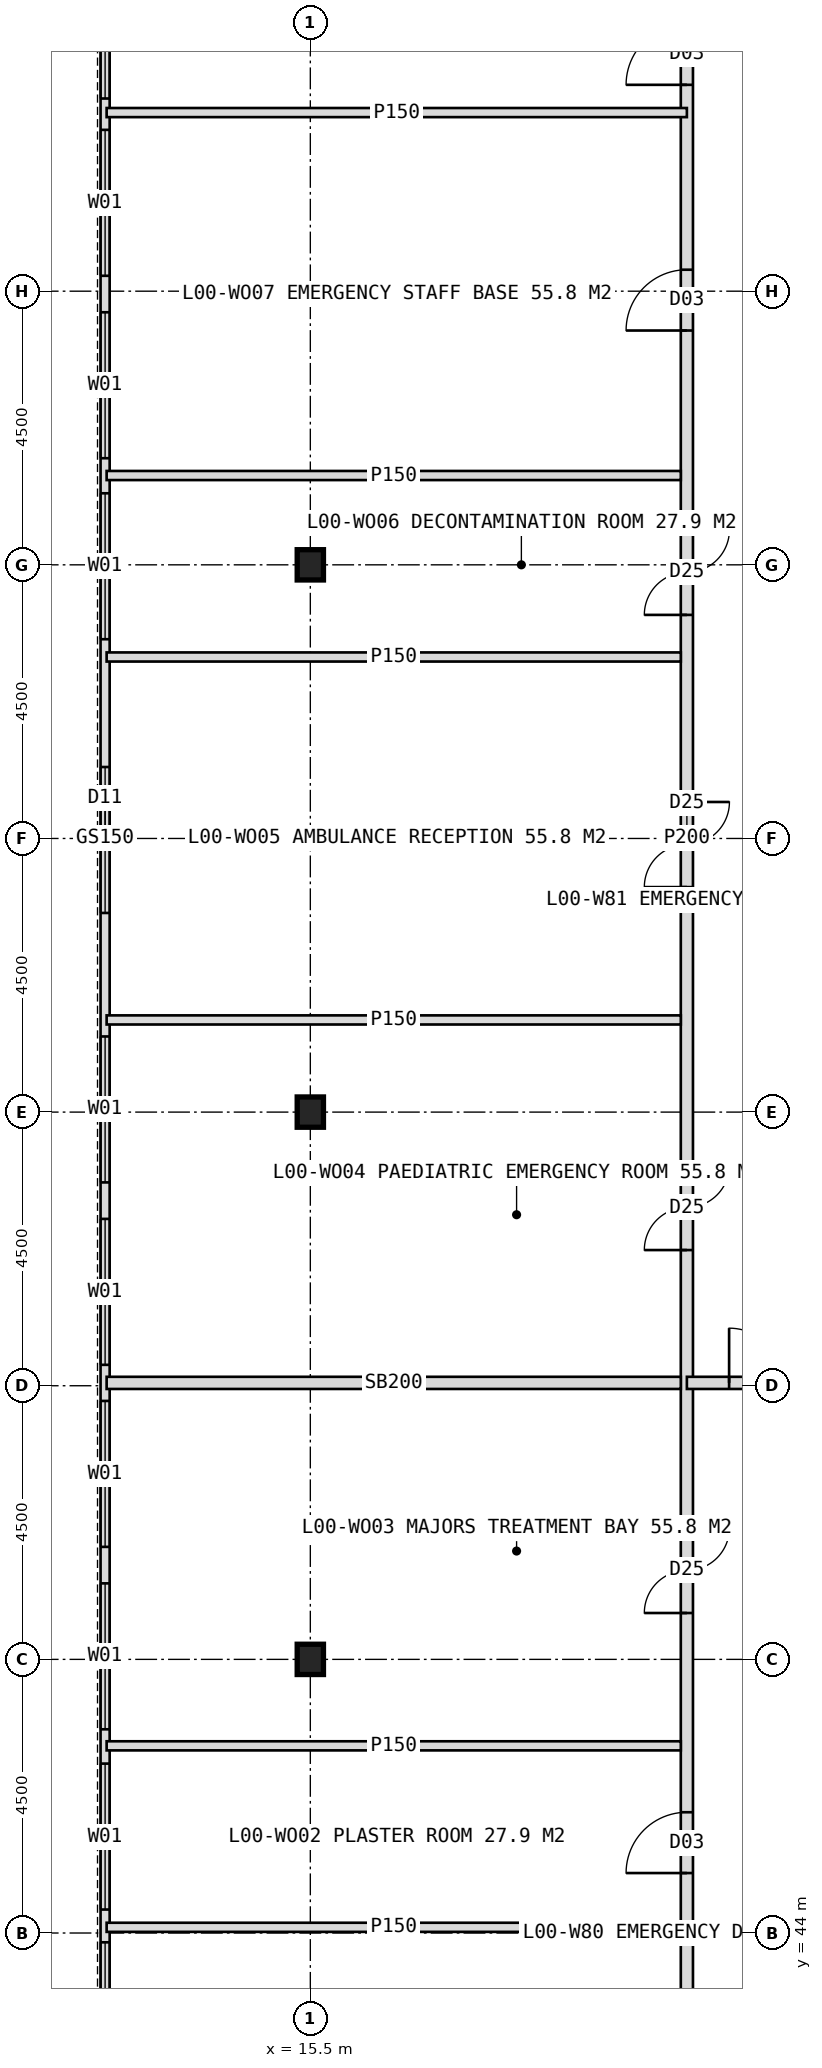
"""IFC4 building model, lengths in metres.
Left out: names, types, materials, properties, quantities, classifications, styles, units other than length and angle.
Written with IfcOpenShell. Run it as: python <this file> out.ifc"""

import sys

from ifc_helpers import new_model, si_unit, direction, frame, frame_2d, origin, origin_2d, place, context, subcontext, project, spatial, rectangle, i_section, extrude, element, fill, save


model = new_model("IFC4")
c1 = context("Model", 3, precision=1e-05, world=origin(), true_north=direction((0.0, 1.0)))
c2 = subcontext(c1, "Body", "Model", "MODEL_VIEW")
j1 = project(units=[si_unit("LENGTHUNIT", "METRE"), si_unit("PLANEANGLEUNIT", "RADIAN")], contexts=[c1])
p1 = place(None, origin())
s1 = spatial("IfcSite", under=j1, at=p1, CompositionType="ELEMENT")
p2 = place(p1, origin())
s2 = spatial("IfcBuilding", under=s1, at=p2, CompositionType="ELEMENT")
p3 = place(p2, origin())
s3 = spatial("IfcBuildingStorey", under=s2, at=p3, CompositionType="ELEMENT", Elevation=0.0)
for number, where, z_axis, x_axis in (
    (1, (15.5, 48.5, 0.0), (0.0, 0.0, 1.0), (1.0, 0.0, 0.0)),
    (2, (15.5, 57.5, 0.0), (0.0, 0.0, 1.0), (1.0, 0.0, 0.0)),
    (3, (15.5, 66.5, 0.0), (0.0, 0.0, 1.0), (1.0, 0.0, 0.0)),
):
    element("IfcColumn", number, at=place(p3, frame(where, z_axis=z_axis, x_axis=x_axis)), inside=s3, PredefinedType="COLUMN", context=c2, shape_type="SweptSolid", body=[
        extrude(i_section(OverallWidth=0.432, OverallDepth=0.498, WebThickness=0.056, FlangeThickness=0.089, FilletRadius=0.015, at=origin_2d()), origin(), (0.0, 0.0, 1.0), 6.0),
    ])
p4 = place(p3, frame((12.125, 85.875, 0.0), z_axis=(0.0, 0.0, 1.0), x_axis=(0.0, -1.0, 0.0)))
e4 = element("IfcWall", 4, at=p4, inside=s3, PredefinedType="STANDARD", context=c2, shape_type="SweptSolid", body=[
    extrude(rectangle(XDim=47.75, YDim=0.15, at=frame_2d((23.875, 0.0))), origin(), (0.0, 0.0, 1.0), 6.0),
])
p5 = place(p4, frame((22.7, 0.0, 0.0)))
e5 = element("IfcOpeningElement", 5, at=p5, cuts=e4, PredefinedType="OPENING", context=c2, shape_type="SweptSolid", body=[
    extrude(rectangle(XDim=2.4, YDim=2.7, at=frame_2d((1.2, 1.35))), frame((0.0, 0.085, 0.0), z_axis=(0.0, -1.0, 0.0), x_axis=(1.0, 0.0, 0.0)), (0.0, 0.0, 1.0), 0.17),
])
p6 = place(p4, frame((0.306, 0.0, 0.6)))
e6 = element("IfcOpeningElement", 6, at=p6, cuts=e4, PredefinedType="OPENING", context=c2, shape_type="SweptSolid", body=[
    extrude(rectangle(XDim=2.4, YDim=3.0, at=frame_2d((1.2, 1.5))), frame((0.0, 0.085, 0.0), z_axis=(0.0, -1.0, 0.0), x_axis=(1.0, 0.0, 0.0)), (0.0, 0.0, 1.0), 0.17),
])
p7 = place(p4, frame((3.306, 0.0, 0.6)))
e7 = element("IfcOpeningElement", 7, at=p7, cuts=e4, PredefinedType="OPENING", context=c2, shape_type="SweptSolid", body=[
    extrude(rectangle(XDim=2.4, YDim=3.0, at=frame_2d((1.2, 1.5))), frame((0.0, 0.085, 0.0), z_axis=(0.0, -1.0, 0.0), x_axis=(1.0, 0.0, 0.0)), (0.0, 0.0, 1.0), 0.17),
])
p8 = place(p4, frame((6.306, 0.0, 0.6)))
e8 = element("IfcOpeningElement", 8, at=p8, cuts=e4, PredefinedType="OPENING", context=c2, shape_type="SweptSolid", body=[
    extrude(rectangle(XDim=2.4, YDim=3.0, at=frame_2d((1.2, 1.5))), frame((0.0, 0.085, 0.0), z_axis=(0.0, -1.0, 0.0), x_axis=(1.0, 0.0, 0.0)), (0.0, 0.0, 1.0), 0.17),
])
p9 = place(p4, frame((9.306, 0.0, 0.6)))
e9 = element("IfcOpeningElement", 9, at=p9, cuts=e4, PredefinedType="OPENING", context=c2, shape_type="SweptSolid", body=[
    extrude(rectangle(XDim=2.4, YDim=3.0, at=frame_2d((1.2, 1.5))), frame((0.0, 0.085, 0.0), z_axis=(0.0, -1.0, 0.0), x_axis=(1.0, 0.0, 0.0)), (0.0, 0.0, 1.0), 0.17),
])
p10 = place(p4, frame((12.222, 0.0, 0.6)))
e10 = element("IfcOpeningElement", 10, at=p10, cuts=e4, PredefinedType="OPENING", context=c2, shape_type="SweptSolid", body=[
    extrude(rectangle(XDim=2.4, YDim=3.0, at=frame_2d((1.2, 1.5))), frame((0.0, 0.085, 0.0), z_axis=(0.0, -1.0, 0.0), x_axis=(1.0, 0.0, 0.0)), (0.0, 0.0, 1.0), 0.17),
])
p11 = place(p4, frame((15.222, 0.0, 0.6)))
e11 = element("IfcOpeningElement", 11, at=p11, cuts=e4, PredefinedType="OPENING", context=c2, shape_type="SweptSolid", body=[
    extrude(rectangle(XDim=2.4, YDim=3.0, at=frame_2d((1.2, 1.5))), frame((0.0, 0.085, 0.0), z_axis=(0.0, -1.0, 0.0), x_axis=(1.0, 0.0, 0.0)), (0.0, 0.0, 1.0), 0.17),
])
p12 = place(p4, frame((18.198, 0.0, 0.6)))
e12 = element("IfcOpeningElement", 12, at=p12, cuts=e4, PredefinedType="OPENING", context=c2, shape_type="SweptSolid", body=[
    extrude(rectangle(XDim=2.4, YDim=3.0, at=frame_2d((1.2, 1.5))), frame((0.0, 0.085, 0.0), z_axis=(0.0, -1.0, 0.0), x_axis=(1.0, 0.0, 0.0)), (0.0, 0.0, 1.0), 0.17),
])
p13 = place(p4, frame((27.131, 0.0, 0.6)))
e13 = element("IfcOpeningElement", 13, at=p13, cuts=e4, PredefinedType="OPENING", context=c2, shape_type="SweptSolid", body=[
    extrude(rectangle(XDim=2.4, YDim=3.0, at=frame_2d((1.2, 1.5))), frame((0.0, 0.085, 0.0), z_axis=(0.0, -1.0, 0.0), x_axis=(1.0, 0.0, 0.0)), (0.0, 0.0, 1.0), 0.17),
])
p14 = place(p4, frame((30.131, 0.0, 0.6)))
e14 = element("IfcOpeningElement", 14, at=p14, cuts=e4, PredefinedType="OPENING", context=c2, shape_type="SweptSolid", body=[
    extrude(rectangle(XDim=2.4, YDim=3.0, at=frame_2d((1.2, 1.5))), frame((0.0, 0.085, 0.0), z_axis=(0.0, -1.0, 0.0), x_axis=(1.0, 0.0, 0.0)), (0.0, 0.0, 1.0), 0.17),
])
p15 = place(p4, frame((33.125, 0.0, 0.6)))
e15 = element("IfcOpeningElement", 15, at=p15, cuts=e4, PredefinedType="OPENING", context=c2, shape_type="SweptSolid", body=[
    extrude(rectangle(XDim=2.4, YDim=3.0, at=frame_2d((1.2, 1.5))), frame((0.0, 0.085, 0.0), z_axis=(0.0, -1.0, 0.0), x_axis=(1.0, 0.0, 0.0)), (0.0, 0.0, 1.0), 0.17),
])
p16 = place(p4, frame((36.125, 0.0, 0.6)))
e16 = element("IfcOpeningElement", 16, at=p16, cuts=e4, PredefinedType="OPENING", context=c2, shape_type="SweptSolid", body=[
    extrude(rectangle(XDim=2.4, YDim=3.0, at=frame_2d((1.2, 1.5))), frame((0.0, 0.085, 0.0), z_axis=(0.0, -1.0, 0.0), x_axis=(1.0, 0.0, 0.0)), (0.0, 0.0, 1.0), 0.17),
])
p17 = place(p4, frame((39.089, 0.0, 0.6)))
e17 = element("IfcOpeningElement", 17, at=p17, cuts=e4, PredefinedType="OPENING", context=c2, shape_type="SweptSolid", body=[
    extrude(rectangle(XDim=2.4, YDim=3.0, at=frame_2d((1.2, 1.5))), frame((0.0, 0.085, 0.0), z_axis=(0.0, -1.0, 0.0), x_axis=(1.0, 0.0, 0.0)), (0.0, 0.0, 1.0), 0.17),
])
p18 = place(p4, frame((42.028, 0.0, 0.6)))
e18 = element("IfcOpeningElement", 18, at=p18, cuts=e4, PredefinedType="OPENING", context=c2, shape_type="SweptSolid", body=[
    extrude(rectangle(XDim=2.4, YDim=3.0, at=frame_2d((1.2, 1.5))), frame((0.0, 0.085, 0.0), z_axis=(0.0, -1.0, 0.0), x_axis=(1.0, 0.0, 0.0)), (0.0, 0.0, 1.0), 0.17),
])
p19 = place(p4, frame((45.028, 0.0, 0.6)))
e19 = element("IfcOpeningElement", 19, at=p19, cuts=e4, PredefinedType="OPENING", context=c2, shape_type="SweptSolid", body=[
    extrude(rectangle(XDim=2.4, YDim=3.0, at=frame_2d((1.2, 1.5))), frame((0.0, 0.085, 0.0), z_axis=(0.0, -1.0, 0.0), x_axis=(1.0, 0.0, 0.0)), (0.0, 0.0, 1.0), 0.17),
])
p20 = place(p3, frame((21.693, 38.15, 0.0), z_axis=(0.0, 0.0, 1.0), x_axis=(0.0, 1.0, 0.0)))
e20 = element("IfcWall", 20, at=p20, inside=s3, PredefinedType="PARTITIONING", context=c2, shape_type="SweptSolid", body=[
    extrude(rectangle(XDim=47.7, YDim=0.2, at=frame_2d((23.85, 0.0))), origin(), (0.0, 0.0, 1.0), 5.7),
])
p21 = place(p20, frame((45.7, 0.0, 0.0)))
e21 = element("IfcOpeningElement", 21, at=p21, cuts=e20, PredefinedType="OPENING", context=c2, shape_type="SweptSolid", body=[
    extrude(rectangle(XDim=1.2, YDim=2.1, at=frame_2d((0.6, 1.05))), frame((0.0, 0.11, 0.0), z_axis=(0.0, -1.0, 0.0), x_axis=(1.0, 0.0, 0.0)), (0.0, 0.0, 1.0), 0.22),
])
p22 = place(p20, frame((36.244, 0.0, 0.0)))
e22 = element("IfcOpeningElement", 22, at=p22, cuts=e20, PredefinedType="OPENING", context=c2, shape_type="SweptSolid", body=[
    extrude(rectangle(XDim=1.0, YDim=2.1, at=frame_2d((0.5, 1.05))), frame((0.0, 0.11, 0.0), z_axis=(0.0, -1.0, 0.0), x_axis=(1.0, 0.0, 0.0)), (0.0, 0.0, 1.0), 0.22),
])
p23 = place(p20, frame((2.222, 0.0, 0.0)))
e23 = element("IfcOpeningElement", 23, at=p23, cuts=e20, PredefinedType="OPENING", context=c2, shape_type="SweptSolid", body=[
    extrude(rectangle(XDim=1.4, YDim=2.2, at=frame_2d((0.7, 1.1))), frame((0.0, 0.11, 0.0), z_axis=(0.0, -1.0, 0.0), x_axis=(1.0, 0.0, 0.0)), (0.0, 0.0, 1.0), 0.22),
])
p24 = place(p20, frame((6.836, 0.0, 0.0)))
e24 = element("IfcOpeningElement", 24, at=p24, cuts=e20, PredefinedType="OPENING", context=c2, shape_type="SweptSolid", body=[
    extrude(rectangle(XDim=1.0, YDim=2.1, at=frame_2d((0.5, 1.05))), frame((0.0, 0.11, 0.0), z_axis=(0.0, -1.0, 0.0), x_axis=(1.0, 0.0, 0.0)), (0.0, 0.0, 1.0), 0.22),
])
p25 = place(p20, frame((11.113, 0.0, 0.0)))
e25 = element("IfcOpeningElement", 25, at=p25, cuts=e20, PredefinedType="OPENING", context=c2, shape_type="SweptSolid", body=[
    extrude(rectangle(XDim=1.4, YDim=2.2, at=frame_2d((0.7, 1.1))), frame((0.0, 0.11, 0.0), z_axis=(0.0, -1.0, 0.0), x_axis=(1.0, 0.0, 0.0)), (0.0, 0.0, 1.0), 0.22),
])
p26 = place(p20, frame((17.081, 0.0, 0.0)))
e26 = element("IfcOpeningElement", 26, at=p26, cuts=e20, PredefinedType="OPENING", context=c2, shape_type="SweptSolid", body=[
    extrude(rectangle(XDim=1.4, YDim=2.2, at=frame_2d((0.7, 1.1))), frame((0.0, 0.11, 0.0), z_axis=(0.0, -1.0, 0.0), x_axis=(1.0, 0.0, 0.0)), (0.0, 0.0, 1.0), 0.22),
])
p27 = place(p20, frame((23.05, 0.0, 0.0)))
e27 = element("IfcOpeningElement", 27, at=p27, cuts=e20, PredefinedType="OPENING", context=c2, shape_type="SweptSolid", body=[
    extrude(rectangle(XDim=1.4, YDim=2.2, at=frame_2d((0.7, 1.1))), frame((0.0, 0.11, 0.0), z_axis=(0.0, -1.0, 0.0), x_axis=(1.0, 0.0, 0.0)), (0.0, 0.0, 1.0), 0.22),
])
p28 = place(p20, frame((27.527, 0.0, 0.0)))
e28 = element("IfcOpeningElement", 28, at=p28, cuts=e20, PredefinedType="OPENING", context=c2, shape_type="SweptSolid", body=[
    extrude(rectangle(XDim=1.4, YDim=2.2, at=frame_2d((0.7, 1.1))), frame((0.0, 0.11, 0.0), z_axis=(0.0, -1.0, 0.0), x_axis=(1.0, 0.0, 0.0)), (0.0, 0.0, 1.0), 0.22),
])
p29 = place(p20, frame((32.203, 0.0, 0.0)))
e29 = element("IfcOpeningElement", 29, at=p29, cuts=e20, PredefinedType="OPENING", context=c2, shape_type="SweptSolid", body=[
    extrude(rectangle(XDim=1.0, YDim=2.1, at=frame_2d((0.5, 1.05))), frame((0.0, 0.11, 0.0), z_axis=(0.0, -1.0, 0.0), x_axis=(1.0, 0.0, 0.0)), (0.0, 0.0, 1.0), 0.22),
])
p30 = place(p3, frame((21.693, 53.047, 0.0), z_axis=(0.0, 0.0, 1.0), x_axis=(1.0, 0.0, 0.0)))
e30 = element("IfcWall", 30, at=p30, inside=s3, PredefinedType="SOLIDWALL", context=c2, shape_type="SweptSolid", body=[
    extrude(rectangle(XDim=3.189, YDim=0.2, at=frame_2d((1.594, 0.0))), origin(), (0.0, 0.0, 1.0), 5.7),
])
p31 = place(p30, frame((0.695, 0.0, 0.0)))
e31 = element("IfcOpeningElement", 31, at=p31, cuts=e30, PredefinedType="OPENING", context=c2, shape_type="SweptSolid", body=[
    extrude(rectangle(XDim=1.8, YDim=2.2, at=frame_2d((0.9, 1.1))), frame((0.0, 0.11, 0.0), z_axis=(0.0, -1.0, 0.0), x_axis=(1.0, 0.0, 0.0)), (0.0, 0.0, 1.0), 0.22),
])
p32 = place(p3, frame((12.15, 73.938, 0.0), z_axis=(0.0, 0.0, 1.0), x_axis=(1.0, 0.0, 0.0)))
e32 = element("IfcWall", 32, at=p32, inside=s3, PredefinedType="PARTITIONING", context=c2, shape_type="SweptSolid", body=[
    extrude(rectangle(XDim=9.543, YDim=0.15, at=frame_2d((4.771, 0.0))), origin(), (0.0, 0.0, 1.0), 5.7),
])
for number, where, z_axis, x_axis in (
    (33, (12.15, 44.094, 0.0), (0.0, 0.0, 1.0), (1.0, 0.0, 0.0)),
    (34, (12.15, 47.078, 0.0), (0.0, 0.0, 1.0), (1.0, 0.0, 0.0)),
):
    element("IfcWall", number, at=place(p3, frame(where, z_axis=z_axis, x_axis=x_axis)), inside=s3, PredefinedType="PARTITIONING", context=c2, shape_type="SweptSolid", body=[
        extrude(rectangle(XDim=9.443, YDim=0.15, at=frame_2d((4.722, 0.0))), origin(), (0.0, 0.0, 1.0), 5.7),
    ])
p33 = place(p3, frame((12.15, 53.047, 0.0), z_axis=(0.0, 0.0, 1.0), x_axis=(1.0, 0.0, 0.0)))
e35 = element("IfcWall", 35, at=p33, inside=s3, PredefinedType="SOLIDWALL", context=c2, shape_type="SweptSolid", body=[
    extrude(rectangle(XDim=9.443, YDim=0.2, at=frame_2d((4.722, 0.0))), origin(), (0.0, 0.0, 1.0), 5.7),
])
for number, where, z_axis, x_axis in (
    (36, (12.15, 59.016, 0.0), (0.0, 0.0, 1.0), (1.0, 0.0, 0.0)),
    (37, (12.15, 64.984, 0.0), (0.0, 0.0, 1.0), (1.0, 0.0, 0.0)),
    (38, (12.15, 67.969, 0.0), (0.0, 0.0, 1.0), (1.0, 0.0, 0.0)),
):
    element("IfcWall", number, at=place(p3, frame(where, z_axis=z_axis, x_axis=x_axis)), inside=s3, PredefinedType="PARTITIONING", context=c2, shape_type="SweptSolid", body=[
        extrude(rectangle(XDim=9.443, YDim=0.15, at=frame_2d((4.722, 0.0))), origin(), (0.0, 0.0, 1.0), 5.7),
    ])
p34 = place(p5, origin())
e39 = element("IfcDoor", 39, at=p34, inside=s3, OperationType="DOUBLE_DOOR_SLIDING", PredefinedType="DOOR", context=c2, shape_type="SweptSolid", body=[
    extrude(rectangle(XDim=2.4, YDim=2.7, at=frame_2d((1.2, 1.35))), frame((0.0, 0.025, 0.0), z_axis=(0.0, -1.0, 0.0), x_axis=(1.0, 0.0, 0.0)), (0.0, 0.0, 1.0), 0.05),
])
fill(e5, e39)
p35 = place(p9, origin())
e40 = element("IfcWindow", 40, at=p35, inside=s3, PartitioningType="SINGLE_PANEL", PredefinedType="WINDOW", context=c2, shape_type="SweptSolid", body=[
    extrude(rectangle(XDim=2.4, YDim=3.0, at=frame_2d((1.2, 1.5))), frame((0.0, 0.03, 0.0), z_axis=(0.0, -1.0, 0.0), x_axis=(1.0, 0.0, 0.0)), (0.0, 0.0, 1.0), 0.06),
])
fill(e9, e40)
p36 = place(p10, origin())
e41 = element("IfcWindow", 41, at=p36, inside=s3, PartitioningType="SINGLE_PANEL", PredefinedType="WINDOW", context=c2, shape_type="SweptSolid", body=[
    extrude(rectangle(XDim=2.4, YDim=3.0, at=frame_2d((1.2, 1.5))), frame((0.0, 0.03, 0.0), z_axis=(0.0, -1.0, 0.0), x_axis=(1.0, 0.0, 0.0)), (0.0, 0.0, 1.0), 0.06),
])
fill(e10, e41)
p37 = place(p11, origin())
e42 = element("IfcWindow", 42, at=p37, inside=s3, PartitioningType="SINGLE_PANEL", PredefinedType="WINDOW", context=c2, shape_type="SweptSolid", body=[
    extrude(rectangle(XDim=2.4, YDim=3.0, at=frame_2d((1.2, 1.5))), frame((0.0, 0.03, 0.0), z_axis=(0.0, -1.0, 0.0), x_axis=(1.0, 0.0, 0.0)), (0.0, 0.0, 1.0), 0.06),
])
fill(e11, e42)
p38 = place(p12, origin())
e43 = element("IfcWindow", 43, at=p38, inside=s3, PartitioningType="SINGLE_PANEL", PredefinedType="WINDOW", context=c2, shape_type="SweptSolid", body=[
    extrude(rectangle(XDim=2.4, YDim=3.0, at=frame_2d((1.2, 1.5))), frame((0.0, 0.03, 0.0), z_axis=(0.0, -1.0, 0.0), x_axis=(1.0, 0.0, 0.0)), (0.0, 0.0, 1.0), 0.06),
])
fill(e12, e43)
p39 = place(p13, origin())
e44 = element("IfcWindow", 44, at=p39, inside=s3, PartitioningType="SINGLE_PANEL", PredefinedType="WINDOW", context=c2, shape_type="SweptSolid", body=[
    extrude(rectangle(XDim=2.4, YDim=3.0, at=frame_2d((1.2, 1.5))), frame((0.0, 0.03, 0.0), z_axis=(0.0, -1.0, 0.0), x_axis=(1.0, 0.0, 0.0)), (0.0, 0.0, 1.0), 0.06),
])
fill(e13, e44)
p40 = place(p14, origin())
e45 = element("IfcWindow", 45, at=p40, inside=s3, PartitioningType="SINGLE_PANEL", PredefinedType="WINDOW", context=c2, shape_type="SweptSolid", body=[
    extrude(rectangle(XDim=2.4, YDim=3.0, at=frame_2d((1.2, 1.5))), frame((0.0, 0.03, 0.0), z_axis=(0.0, -1.0, 0.0), x_axis=(1.0, 0.0, 0.0)), (0.0, 0.0, 1.0), 0.06),
])
fill(e14, e45)
p41 = place(p15, origin())
e46 = element("IfcWindow", 46, at=p41, inside=s3, PartitioningType="SINGLE_PANEL", PredefinedType="WINDOW", context=c2, shape_type="SweptSolid", body=[
    extrude(rectangle(XDim=2.4, YDim=3.0, at=frame_2d((1.2, 1.5))), frame((0.0, 0.03, 0.0), z_axis=(0.0, -1.0, 0.0), x_axis=(1.0, 0.0, 0.0)), (0.0, 0.0, 1.0), 0.06),
])
fill(e15, e46)
p42 = place(p16, origin())
e47 = element("IfcWindow", 47, at=p42, inside=s3, PartitioningType="SINGLE_PANEL", PredefinedType="WINDOW", context=c2, shape_type="SweptSolid", body=[
    extrude(rectangle(XDim=2.4, YDim=3.0, at=frame_2d((1.2, 1.5))), frame((0.0, 0.03, 0.0), z_axis=(0.0, -1.0, 0.0), x_axis=(1.0, 0.0, 0.0)), (0.0, 0.0, 1.0), 0.06),
])
fill(e16, e47)
p43 = place(p17, origin())
e48 = element("IfcWindow", 48, at=p43, inside=s3, PartitioningType="SINGLE_PANEL", PredefinedType="WINDOW", context=c2, shape_type="SweptSolid", body=[
    extrude(rectangle(XDim=2.4, YDim=3.0, at=frame_2d((1.2, 1.5))), frame((0.0, 0.03, 0.0), z_axis=(0.0, -1.0, 0.0), x_axis=(1.0, 0.0, 0.0)), (0.0, 0.0, 1.0), 0.06),
])
fill(e17, e48)
p44 = place(p18, origin())
e49 = element("IfcWindow", 49, at=p44, inside=s3, PartitioningType="SINGLE_PANEL", PredefinedType="WINDOW", context=c2, shape_type="SweptSolid", body=[
    extrude(rectangle(XDim=2.4, YDim=3.0, at=frame_2d((1.2, 1.5))), frame((0.0, 0.03, 0.0), z_axis=(0.0, -1.0, 0.0), x_axis=(1.0, 0.0, 0.0)), (0.0, 0.0, 1.0), 0.06),
])
fill(e18, e49)
p45 = place(p31, origin())
e50 = element("IfcDoor", 50, at=p45, inside=s3, OperationType="DOUBLE_DOOR_DOUBLE_SWING", PredefinedType="DOOR", context=c2, shape_type="SweptSolid", body=[
    extrude(rectangle(XDim=1.8, YDim=2.2, at=frame_2d((0.9, 1.1))), frame((0.0, 0.025, 0.0), z_axis=(0.0, -1.0, 0.0), x_axis=(1.0, 0.0, 0.0)), (0.0, 0.0, 1.0), 0.05),
])
fill(e31, e50)
p46 = place(p22, origin())
e51 = element("IfcDoor", 51, at=p46, inside=s3, OperationType="SINGLE_SWING_LEFT", PredefinedType="DOOR", context=c2, shape_type="SweptSolid", body=[
    extrude(rectangle(XDim=1.0, YDim=2.1, at=frame_2d((0.5, 1.05))), frame((0.0, 0.025, 0.0), z_axis=(0.0, -1.0, 0.0), x_axis=(1.0, 0.0, 0.0)), (0.0, 0.0, 1.0), 0.05),
])
fill(e22, e51)
p47 = place(p24, origin())
e52 = element("IfcDoor", 52, at=p47, inside=s3, OperationType="SINGLE_SWING_LEFT", PredefinedType="DOOR", context=c2, shape_type="SweptSolid", body=[
    extrude(rectangle(XDim=1.0, YDim=2.1, at=frame_2d((0.5, 1.05))), frame((0.0, 0.025, 0.0), z_axis=(0.0, -1.0, 0.0), x_axis=(1.0, 0.0, 0.0)), (0.0, 0.0, 1.0), 0.05),
])
fill(e24, e52)
p48 = place(p25, origin())
e53 = element("IfcDoor", 53, at=p48, inside=s3, OperationType="DOUBLE_DOOR_SINGLE_SWING", PredefinedType="DOOR", context=c2, shape_type="SweptSolid", body=[
    extrude(rectangle(XDim=1.4, YDim=2.2, at=frame_2d((0.7, 1.1))), frame((0.0, 0.025, 0.0), z_axis=(0.0, -1.0, 0.0), x_axis=(1.0, 0.0, 0.0)), (0.0, 0.0, 1.0), 0.05),
])
fill(e25, e53)
p49 = place(p26, origin())
e54 = element("IfcDoor", 54, at=p49, inside=s3, OperationType="DOUBLE_DOOR_SINGLE_SWING", PredefinedType="DOOR", context=c2, shape_type="SweptSolid", body=[
    extrude(rectangle(XDim=1.4, YDim=2.2, at=frame_2d((0.7, 1.1))), frame((0.0, 0.025, 0.0), z_axis=(0.0, -1.0, 0.0), x_axis=(1.0, 0.0, 0.0)), (0.0, 0.0, 1.0), 0.05),
])
fill(e26, e54)
p50 = place(p27, origin())
e55 = element("IfcDoor", 55, at=p50, inside=s3, OperationType="DOUBLE_DOOR_SINGLE_SWING", PredefinedType="DOOR", context=c2, shape_type="SweptSolid", body=[
    extrude(rectangle(XDim=1.4, YDim=2.2, at=frame_2d((0.7, 1.1))), frame((0.0, 0.025, 0.0), z_axis=(0.0, -1.0, 0.0), x_axis=(1.0, 0.0, 0.0)), (0.0, 0.0, 1.0), 0.05),
])
fill(e27, e55)
p51 = place(p28, origin())
e56 = element("IfcDoor", 56, at=p51, inside=s3, OperationType="DOUBLE_DOOR_SINGLE_SWING", PredefinedType="DOOR", context=c2, shape_type="SweptSolid", body=[
    extrude(rectangle(XDim=1.4, YDim=2.2, at=frame_2d((0.7, 1.1))), frame((0.0, 0.025, 0.0), z_axis=(0.0, -1.0, 0.0), x_axis=(1.0, 0.0, 0.0)), (0.0, 0.0, 1.0), 0.05),
])
fill(e28, e56)
p52 = place(p29, origin())
e57 = element("IfcDoor", 57, at=p52, inside=s3, OperationType="SINGLE_SWING_LEFT", PredefinedType="DOOR", context=c2, shape_type="SweptSolid", body=[
    extrude(rectangle(XDim=1.0, YDim=2.1, at=frame_2d((0.5, 1.05))), frame((0.0, 0.025, 0.0), z_axis=(0.0, -1.0, 0.0), x_axis=(1.0, 0.0, 0.0)), (0.0, 0.0, 1.0), 0.05),
])
fill(e29, e57)
save(model, sys.argv[1])
